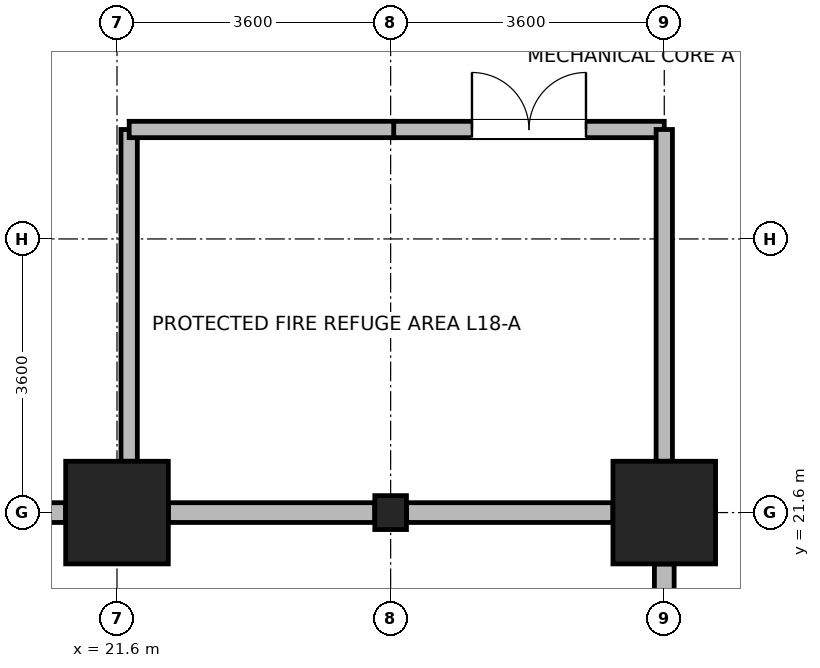
"""IFC4 building model, lengths in metres.
Left out: names, types, materials, properties, quantities, classifications, styles, units other than length and angle.
Written with IfcOpenShell. Run it as: python <this file> out.ifc"""

import sys

from ifc_helpers import new_model, si_unit, direction, frame, frame_2d, origin, origin_2d, place, context, subcontext, project, spatial, rectangle, i_section, extrude, source, transform, mapped, element, fill, save


model = new_model("IFC4")
c1 = context("Model", 3, precision=1e-05, world=origin(), true_north=direction((0.0, 1.0)))
c2 = subcontext(c1, "Body", "Model", "MODEL_VIEW")
j1 = project(units=[si_unit("LENGTHUNIT", "METRE"), si_unit("PLANEANGLEUNIT", "RADIAN")], contexts=[c1])
p1 = place(None, origin())
s1 = spatial("IfcSite", under=j1, at=p1, CompositionType="ELEMENT")
p2 = place(p1, origin())
s2 = spatial("IfcBuilding", under=s1, at=p2, CompositionType="ELEMENT")
p3 = place(p2, frame((0.0, 0.0, 73.4)))
s3 = spatial("IfcBuildingStorey", under=s2, at=p3, CompositionType="ELEMENT", Elevation=73.4)
m1 = source(origin(), c2, "Body", "SweptSolid", [
    extrude(rectangle(XDim=1.35, YDim=1.35, at=origin_2d()), origin(), (0.0, 0.0, 1.0), 5.2),
])
for number, where, z_axis, x_axis in (
    (1, (21.6, 21.6, 0.0), (0.0, 0.0, 1.0), (1.0, 0.0, 0.0)),
    (2, (28.8, 21.6, 0.0), (0.0, 0.0, 1.0), (1.0, 0.0, 0.0)),
):
    element("IfcColumn", number, at=place(p3, frame(where, z_axis=z_axis, x_axis=x_axis)), inside=s3, PredefinedType="COLUMN", context=c2, shape_type="MappedRepresentation", body=[
        mapped(m1, transform((0.0, 0.0, 0.0), x_axis=(1.0, 0.0, 0.0), y_axis=(0.0, 1.0, 0.0), z_axis=(0.0, 0.0, 1.0), scale=1.0)),
    ])
m2 = source(origin(), c2, "Body", "SweptSolid", [
    extrude(i_section(OverallWidth=0.416, OverallDepth=0.446, WebThickness=0.029, FlangeThickness=0.04, FilletRadius=0.015, at=origin_2d()), origin(), (0.0, 0.0, 1.0), 5.2),
])
p4 = place(p3, frame((25.2, 21.6, 0.0), z_axis=(0.0, 0.0, 1.0), x_axis=(1.0, 0.0, 0.0)))
e3 = element("IfcColumn", 3, at=p4, inside=s3, PredefinedType="COLUMN", context=c2, shape_type="MappedRepresentation", body=[
    mapped(m2, transform((0.0, 0.0, 0.0), x_axis=(1.0, 0.0, 0.0), y_axis=(0.0, 1.0, 0.0), z_axis=(0.0, 0.0, 1.0), scale=1.0)),
])
for number, where, z_axis, x_axis in (
    (4, (20.924, 21.6, 0.0), (0.0, 0.0, 1.0), (-1.0, 0.0, 0.0)),
    (5, (24.991, 21.6, 0.0), (0.0, 0.0, 1.0), (-1.0, 0.0, 0.0)),
    (6, (28.124, 21.6, 0.0), (0.0, 0.0, 1.0), (-1.0, 0.0, 0.0)),
):
    element("IfcWall", number, at=place(p3, frame(where, z_axis=z_axis, x_axis=x_axis)), inside=s3, PredefinedType="STANDARD", context=c2, shape_type="SweptSolid", body=[
        extrude(rectangle(XDim=2.715, YDim=0.26, at=frame_2d((1.357, 0.0))), origin(), (0.0, 0.0, 1.0), 2.96),
    ])
p5 = place(p3, frame((28.8, 1.67, 0.0), z_axis=(0.0, 0.0, 1.0), x_axis=(0.0, 1.0, 0.0)))
e7 = element("IfcWall", 7, at=p5, inside=s3, PredefinedType="STANDARD", context=c2, shape_type="SweptSolid", body=[
    extrude(rectangle(XDim=19.254, YDim=0.26, at=frame_2d((9.627, 0.0))), origin(), (0.0, 0.0, 1.0), 4.76),
])
p6 = place(p3, frame((25.24, 26.64, 0.0), z_axis=(0.0, 0.0, 1.0), x_axis=(1.0, 0.0, 0.0)))
e8 = element("IfcWall", 8, at=p6, inside=s3, PredefinedType="PARTITIONING", context=c2, shape_type="SweptSolid", body=[
    extrude(rectangle(XDim=3.56, YDim=0.215, at=frame_2d((1.78, 0.0))), origin(), (0.0, 0.0, 1.0), 4.76),
])
p7 = place(p6, frame((1.03, 0.0, 0.0)))
e9 = element("IfcOpeningElement", 9, at=p7, cuts=e8, PredefinedType="OPENING", context=c2, shape_type="SweptSolid", body=[
    extrude(rectangle(XDim=1.5, YDim=2.1, at=frame_2d((0.75, 1.05))), frame((0.0, 0.118, 0.0), z_axis=(0.0, -1.0, 0.0), x_axis=(1.0, 0.0, 0.0)), (0.0, 0.0, 1.0), 0.235),
])
p8 = place(p3, frame((21.76, 22.275, 0.0), z_axis=(0.0, 0.0, 1.0), x_axis=(0.0, 1.0, 0.0)))
e10 = element("IfcWall", 10, at=p8, inside=s3, PredefinedType="PARTITIONING", context=c2, shape_type="SweptSolid", body=[
    extrude(rectangle(XDim=4.365, YDim=0.215, at=frame_2d((2.183, 0.0))), origin(), (0.0, 0.0, 1.0), 3.16),
])
p9 = place(p3, frame((28.8, 22.275, 0.0), z_axis=(0.0, 0.0, 1.0), x_axis=(0.0, 1.0, 0.0)))
e11 = element("IfcWall", 11, at=p9, inside=s3, PredefinedType="PARTITIONING", context=c2, shape_type="SweptSolid", body=[
    extrude(rectangle(XDim=4.365, YDim=0.215, at=frame_2d((2.183, 0.0))), origin(), (0.0, 0.0, 1.0), 2.96),
])
p10 = place(p3, frame((21.76, 26.64, 0.0), z_axis=(0.0, 0.0, 1.0), x_axis=(1.0, 0.0, 0.0)))
e12 = element("IfcWall", 12, at=p10, inside=s3, PredefinedType="PARTITIONING", context=c2, shape_type="SweptSolid", body=[
    extrude(rectangle(XDim=3.48, YDim=0.215, at=frame_2d((1.74, 0.0))), origin(), (0.0, 0.0, 1.0), 4.76),
])
p11 = place(p7, origin())
e13 = element("IfcDoor", 13, at=p11, inside=s3, OperationType="DOUBLE_DOOR_SINGLE_SWING", PredefinedType="DOOR", context=c2, shape_type="SweptSolid", body=[
    extrude(rectangle(XDim=1.5, YDim=2.1, at=frame_2d((0.75, 1.05))), frame((0.0, 0.025, 0.0), z_axis=(0.0, -1.0, 0.0), x_axis=(1.0, 0.0, 0.0)), (0.0, 0.0, 1.0), 0.05),
])
fill(e9, e13)
save(model, sys.argv[1])
